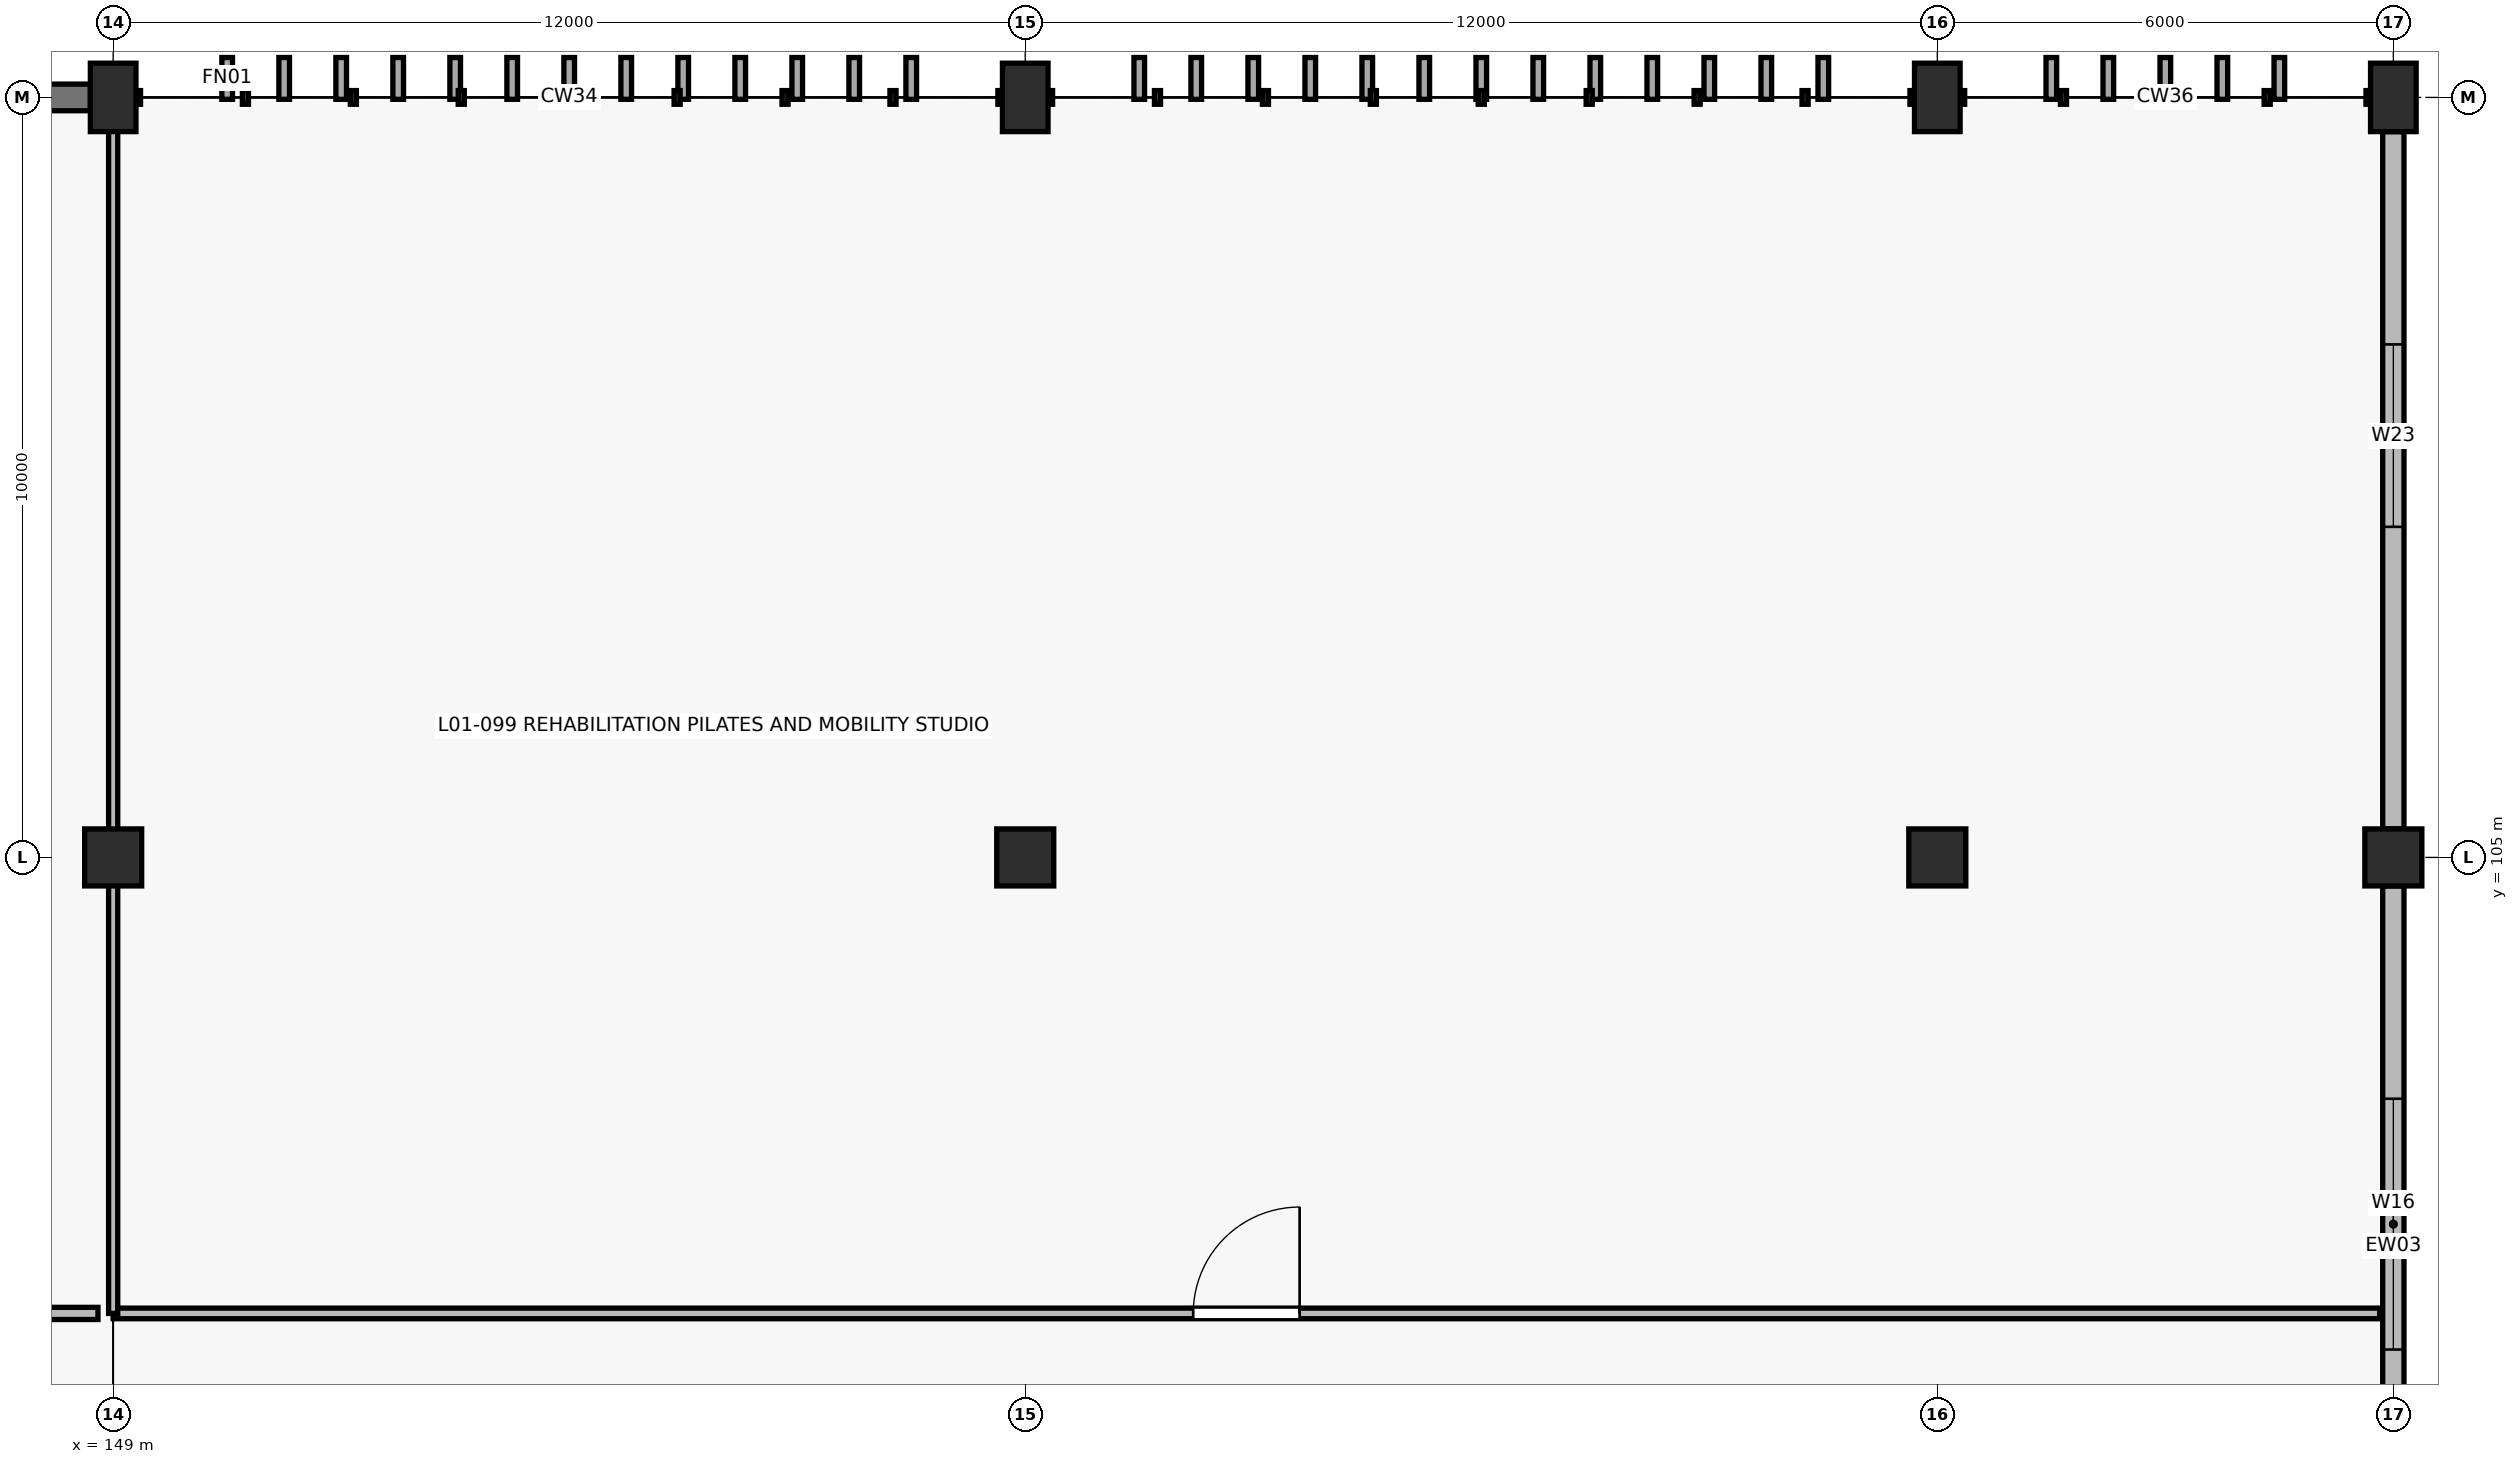
"""IFC4 building model, lengths in metres.
Left out: names, types, materials, properties, quantities, classifications, styles, units other than length and angle.
Written with IfcOpenShell. Run it as: python <this file> out.ifc"""

import sys

from ifc_helpers import new_model, si_unit, direction, frame, frame_2d, origin, origin_2d, place, context, subcontext, project, spatial, rectangle, extrude, element, fill, save


model = new_model("IFC4")
c1 = context("Model", 3, precision=1e-05, world=origin(), true_north=direction((0.0, 1.0)))
c2 = subcontext(c1, "Body", "Model", "MODEL_VIEW")
j1 = project(units=[si_unit("LENGTHUNIT", "METRE"), si_unit("PLANEANGLEUNIT", "RADIAN")], contexts=[c1])
p1 = place(None, origin())
s1 = spatial("IfcSite", under=j1, at=p1, CompositionType="ELEMENT")
p2 = place(p1, origin())
s2 = spatial("IfcBuilding", under=s1, at=p2, CompositionType="ELEMENT")
p3 = place(p2, frame((0.0, 0.0, 4.8)))
s3 = spatial("IfcBuildingStorey", under=s2, at=p3, CompositionType="ELEMENT", Elevation=4.8)
p4 = place(p3, frame((149.0, 105.0, 0.0), z_axis=(0.0, 0.0, 1.0), x_axis=(1.0, 0.0, 0.0)))
e1 = element("IfcColumn", 1, at=p4, inside=s3, PredefinedType="COLUMN", context=c2, shape_type="SweptSolid", body=[
    extrude(rectangle(XDim=0.75, YDim=0.75, at=origin_2d()), origin(), (0.0, 0.0, 1.0), 4.2),
])
p5 = place(p3, frame((149.0, 115.0, 0.0), z_axis=(0.0, 0.0, 1.0), x_axis=(1.0, 0.0, 0.0)))
e2 = element("IfcColumn", 2, at=p5, inside=s3, PredefinedType="COLUMN", context=c2, shape_type="SweptSolid", body=[
    extrude(rectangle(XDim=0.6, YDim=0.9, at=origin_2d()), origin(), (0.0, 0.0, 1.0), 4.2),
])
p6 = place(p3, frame((161.0, 105.0, 0.0), z_axis=(0.0, 0.0, 1.0), x_axis=(1.0, 0.0, 0.0)))
e3 = element("IfcColumn", 3, at=p6, inside=s3, PredefinedType="COLUMN", context=c2, shape_type="SweptSolid", body=[
    extrude(rectangle(XDim=0.75, YDim=0.75, at=origin_2d()), origin(), (0.0, 0.0, 1.0), 4.2),
])
p7 = place(p3, frame((161.0, 115.0, 0.0), z_axis=(0.0, 0.0, 1.0), x_axis=(1.0, 0.0, 0.0)))
e4 = element("IfcColumn", 4, at=p7, inside=s3, PredefinedType="COLUMN", context=c2, shape_type="SweptSolid", body=[
    extrude(rectangle(XDim=0.6, YDim=0.9, at=origin_2d()), origin(), (0.0, 0.0, 1.0), 4.2),
])
p8 = place(p3, frame((173.0, 105.0, 0.0), z_axis=(0.0, 0.0, 1.0), x_axis=(1.0, 0.0, 0.0)))
e5 = element("IfcColumn", 5, at=p8, inside=s3, PredefinedType="COLUMN", context=c2, shape_type="SweptSolid", body=[
    extrude(rectangle(XDim=0.75, YDim=0.75, at=origin_2d()), origin(), (0.0, 0.0, 1.0), 4.2),
])
p9 = place(p3, frame((173.0, 115.0, 0.0), z_axis=(0.0, 0.0, 1.0), x_axis=(1.0, 0.0, 0.0)))
e6 = element("IfcColumn", 6, at=p9, inside=s3, PredefinedType="COLUMN", context=c2, shape_type="SweptSolid", body=[
    extrude(rectangle(XDim=0.6, YDim=0.9, at=origin_2d()), origin(), (0.0, 0.0, 1.0), 4.2),
])
p10 = place(p3, frame((179.0, 105.0, 0.0), z_axis=(0.0, 0.0, 1.0), x_axis=(1.0, 0.0, 0.0)))
e7 = element("IfcColumn", 7, at=p10, inside=s3, PredefinedType="COLUMN", context=c2, shape_type="SweptSolid", body=[
    extrude(rectangle(XDim=0.75, YDim=0.75, at=origin_2d()), origin(), (0.0, 0.0, 1.0), 4.2),
])
p11 = place(p3, frame((179.0, 115.0, 0.0), z_axis=(0.0, 0.0, 1.0), x_axis=(1.0, 0.0, 0.0)))
e8 = element("IfcColumn", 8, at=p11, inside=s3, PredefinedType="COLUMN", context=c2, shape_type="SweptSolid", body=[
    extrude(rectangle(XDim=0.6, YDim=0.9, at=origin_2d()), origin(), (0.0, 0.0, 1.0), 4.2),
])
p12 = place(p3, frame((137.3, 115.0, 0.0), z_axis=(0.0, 0.0, 1.0), x_axis=(1.0, 0.0, 0.0)))
e9 = element("IfcWall", 9, at=p12, inside=s3, PredefinedType="SOLIDWALL", context=c2, shape_type="SweptSolid", body=[
    extrude(rectangle(XDim=11.4, YDim=0.35, at=frame_2d((5.7, 0.0))), origin(), (0.0, 0.0, 1.0), 4.2),
])
p13 = place(p12, frame((2.2, 0.0, 1.0)))
e10 = element("IfcOpeningElement", 10, at=p13, cuts=e9, PredefinedType="OPENING", context=c2, shape_type="SweptSolid", body=[
    extrude(rectangle(XDim=2.4, YDim=1.8, at=frame_2d((1.2, 0.9))), frame((0.0, 0.185, 0.0), z_axis=(0.0, -1.0, 0.0), x_axis=(1.0, 0.0, 0.0)), (0.0, 0.0, 1.0), 0.37),
])
p14 = place(p3, frame((179.0, 104.625, 0.0), z_axis=(0.0, 0.0, 1.0), x_axis=(0.0, -1.0, 0.0)))
e11 = element("IfcWall", 11, at=p14, inside=s3, PredefinedType="SOLIDWALL", context=c2, shape_type="SweptSolid", body=[
    extrude(rectangle(XDim=9.475, YDim=0.28, at=frame_2d((4.738, 0.0))), origin(), (0.0, 0.0, 1.0), 3.125),
])
p15 = place(p14, frame((2.8, 0.0, 0.9)))
e12 = element("IfcOpeningElement", 12, at=p15, cuts=e11, PredefinedType="OPENING", context=c2, shape_type="SweptSolid", body=[
    extrude(rectangle(XDim=3.3, YDim=1.8, at=frame_2d((1.65, 0.9))), frame((0.0, 0.15, 0.0), z_axis=(0.0, -1.0, 0.0), x_axis=(1.0, 0.0, 0.0)), (0.0, 0.0, 1.0), 0.3),
])
p16 = place(p3, frame((179.0, 114.55, 0.0), z_axis=(0.0, 0.0, 1.0), x_axis=(0.0, -1.0, 0.0)))
e13 = element("IfcWall", 13, at=p16, inside=s3, PredefinedType="SOLIDWALL", context=c2, shape_type="SweptSolid", body=[
    extrude(rectangle(XDim=9.175, YDim=0.28, at=frame_2d((4.587, 0.0))), origin(), (0.0, 0.0, 1.0), 3.125),
])
p17 = place(p16, frame((2.8, 0.0, 0.9)))
e14 = element("IfcOpeningElement", 14, at=p17, cuts=e13, PredefinedType="OPENING", context=c2, shape_type="SweptSolid", body=[
    extrude(rectangle(XDim=2.4, YDim=1.1, at=frame_2d((1.2, 0.55))), frame((0.0, 0.15, 0.0), z_axis=(0.0, -1.0, 0.0), x_axis=(1.0, 0.0, 0.0)), (0.0, 0.0, 1.0), 0.3),
])
p18 = place(p3, frame((137.4, 99.0, 0.0), z_axis=(0.0, 0.0, 1.0), x_axis=(1.0, 0.0, 0.0)))
e15 = element("IfcWall", 15, at=p18, inside=s3, PredefinedType="PARTITIONING", context=c2, shape_type="SweptSolid", body=[
    extrude(rectangle(XDim=11.4, YDim=0.16, at=frame_2d((5.7, 0.0))), origin(), (0.0, 0.0, 1.0), 3.125),
])
p19 = place(p18, frame((4.5, 0.0, 0.0)))
e16 = element("IfcOpeningElement", 16, at=p19, cuts=e15, PredefinedType="OPENING", context=c2, shape_type="SweptSolid", body=[
    extrude(rectangle(XDim=1.6, YDim=2.2, at=frame_2d((0.8, 1.1))), frame((0.0, 0.09, 0.0), z_axis=(0.0, -1.0, 0.0), x_axis=(1.0, 0.0, 0.0)), (0.0, 0.0, 1.0), 0.18),
])
p20 = place(p3, frame((149.0, 99.0, 0.0), z_axis=(0.0, 0.0, 1.0), x_axis=(1.0, 0.0, 0.0)))
e17 = element("IfcWall", 17, at=p20, inside=s3, PredefinedType="PARTITIONING", context=c2, shape_type="SweptSolid", body=[
    extrude(rectangle(XDim=29.82, YDim=0.14, at=frame_2d((14.91, 0.0))), origin(), (0.0, 0.0, 1.0), 3.125),
])
p21 = place(p20, frame((14.21, 0.0, 0.0)))
e18 = element("IfcOpeningElement", 18, at=p21, cuts=e17, PredefinedType="OPENING", context=c2, shape_type="SweptSolid", body=[
    extrude(rectangle(XDim=1.4, YDim=2.2, at=frame_2d((0.7, 1.1))), frame((0.0, 0.08, 0.0), z_axis=(0.0, -1.0, 0.0), x_axis=(1.0, 0.0, 0.0)), (0.0, 0.0, 1.0), 0.16),
])
p22 = place(p3, frame((149.0, 99.0, 0.0), z_axis=(0.0, 0.0, 1.0), x_axis=(0.0, 1.0, 0.0)))
e19 = element("IfcWall", 19, at=p22, inside=s3, PredefinedType="PARTITIONING", context=c2, shape_type="SweptSolid", body=[
    extrude(rectangle(XDim=15.75, YDim=0.12, at=frame_2d((7.875, 0.0))), origin(), (0.0, 0.0, 1.0), 3.125),
])
p23 = place(p15, origin())
e20 = element("IfcWindow", 20, at=p23, inside=s3, PartitioningType="DOUBLE_PANEL_VERTICAL", PredefinedType="WINDOW", context=c2, shape_type="SweptSolid", body=[
    extrude(rectangle(XDim=3.3, YDim=1.8, at=frame_2d((1.65, 0.9))), frame((0.0, 0.03, 0.0), z_axis=(0.0, -1.0, 0.0), x_axis=(1.0, 0.0, 0.0)), (0.0, 0.0, 1.0), 0.06),
])
fill(e12, e20)
p24 = place(p17, origin())
e21 = element("IfcWindow", 21, at=p24, inside=s3, PartitioningType="DOUBLE_PANEL_VERTICAL", PredefinedType="WINDOW", context=c2, shape_type="SweptSolid", body=[
    extrude(rectangle(XDim=2.4, YDim=1.1, at=frame_2d((1.2, 0.55))), frame((0.0, 0.03, 0.0), z_axis=(0.0, -1.0, 0.0), x_axis=(1.0, 0.0, 0.0)), (0.0, 0.0, 1.0), 0.06),
])
fill(e14, e21)
p25 = place(p21, origin())
e22 = element("IfcDoor", 22, at=p25, inside=s3, OperationType="SINGLE_SWING_RIGHT", PredefinedType="DOOR", context=c2, shape_type="SweptSolid", body=[
    extrude(rectangle(XDim=1.4, YDim=2.2, at=frame_2d((0.7, 1.1))), frame((0.0, 0.025, 0.0), z_axis=(0.0, -1.0, 0.0), x_axis=(1.0, 0.0, 0.0)), (0.0, 0.0, 1.0), 0.05),
])
fill(e18, e22)
save(model, sys.argv[1])
